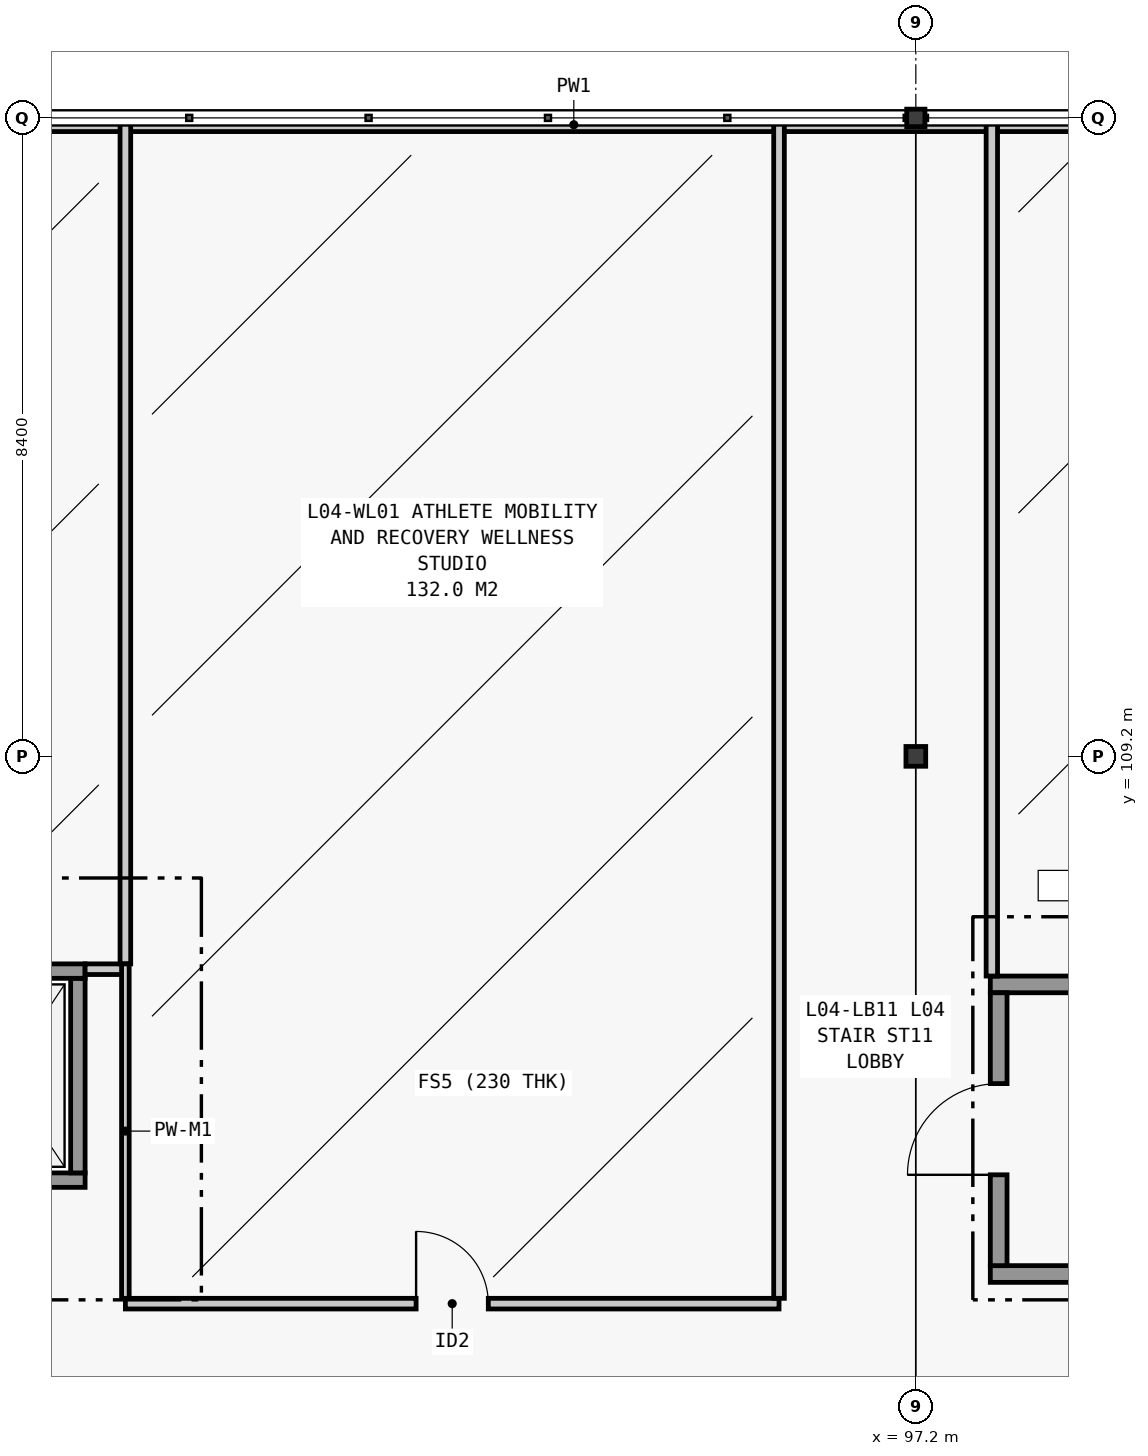
"""IFC4 building model, lengths in metres.
Left out: names, types, materials, properties, quantities, classifications, styles, units other than length and angle.
Written with IfcOpenShell. Run it as: python <this file> out.ifc"""

import sys

from ifc_helpers import new_model, si_unit, direction, frame, frame_2d, origin, origin_2d, place, context, subcontext, project, spatial, rectangle, i_section, extrude, element, fill, save


model = new_model("IFC4")
c1 = context("Model", 3, precision=1e-05, world=origin(), true_north=direction((0.0, 1.0)))
c2 = subcontext(c1, "Body", "Model", "MODEL_VIEW")
j1 = project(units=[si_unit("LENGTHUNIT", "METRE"), si_unit("PLANEANGLEUNIT", "RADIAN")], contexts=[c1])
p1 = place(None, origin())
s1 = spatial("IfcSite", under=j1, at=p1, CompositionType="ELEMENT")
p2 = place(p1, origin())
s2 = spatial("IfcBuilding", under=s1, at=p2, CompositionType="ELEMENT")
p3 = place(p2, frame((0.0, 0.0, 17.4)))
s3 = spatial("IfcBuildingStorey", under=s2, at=p3, CompositionType="ELEMENT", Elevation=17.4)
p4 = place(p3, frame((97.2, 109.2, 0.0), z_axis=(0.0, 0.0, 1.0), x_axis=(1.0, 0.0, 0.0)))
e1 = element("IfcColumn", 1, at=p4, inside=s3, PredefinedType="COLUMN", context=c2, shape_type="SweptSolid", body=[
    extrude(i_section(OverallWidth=0.26, OverallDepth=0.26, WebThickness=0.01, FlangeThickness=0.018, FilletRadius=0.024, at=origin_2d()), origin(), (0.0, 0.0, 1.0), 4.15),
])
p5 = place(p3, frame((97.2, 117.6, 0.0), z_axis=(0.0, 0.0, 1.0), x_axis=(1.0, 0.0, 0.0)))
e2 = element("IfcColumn", 2, at=p5, inside=s3, PredefinedType="COLUMN", context=c2, shape_type="SweptSolid", body=[
    extrude(i_section(OverallWidth=0.24, OverallDepth=0.23, WebThickness=0.008, FlangeThickness=0.012, FilletRadius=0.021, at=origin_2d()), origin(), (0.0, 0.0, 1.0), 4.15),
])
p6 = place(p3, frame((68.4, 117.51, 4.2), z_axis=(0.0, 0.0, 1.0), x_axis=(1.0, 0.0, 0.0)))
e3 = element("IfcWall", 3, at=p6, inside=s3, PredefinedType="PARAPET", context=c2, shape_type="SweptSolid", body=[
    extrude(rectangle(XDim=57.6, YDim=0.18, at=frame_2d((28.8, 0.0))), origin(), (0.0, 0.0, 1.0), 0.95),
])
for number, where, z_axis, x_axis in (
    (4, (98.18, 102.39, 0.0), (0.0, 0.0, 1.0), (1.0, 0.0, 0.0)),
    (5, (106.95, 106.2, 0.0), (0.0, 0.0, 1.0), (-1.0, 0.0, 0.0)),
):
    element("IfcWall", number, at=place(p3, frame(where, z_axis=z_axis, x_axis=x_axis)), inside=s3, PredefinedType="SOLIDWALL", context=c2, shape_type="SweptSolid", body=[
        extrude(rectangle(XDim=8.77, YDim=0.22, at=frame_2d((4.385, 0.0))), origin(), (0.0, 0.0, 1.0), 3.98),
    ])
p7 = place(p3, frame((98.29, 106.09, 0.0), z_axis=(0.0, 0.0, 1.0), x_axis=(0.0, -1.0, 0.0)))
e6 = element("IfcWall", 6, at=p7, inside=s3, PredefinedType="SOLIDWALL", context=c2, shape_type="SweptSolid", body=[
    extrude(rectangle(XDim=3.59, YDim=0.22, at=frame_2d((1.795, 0.0))), origin(), (0.0, 0.0, 1.0), 3.98),
])
p8 = place(p7, frame((1.195, 0.0, 0.0)))
e7 = element("IfcOpeningElement", 7, at=p8, cuts=e6, PredefinedType="OPENING", context=c2, shape_type="SweptSolid", body=[
    extrude(rectangle(XDim=1.2, YDim=2.2, at=frame_2d((0.6, 1.1))), frame((0.0, 0.125, 0.0), z_axis=(0.0, -1.0, 0.0), x_axis=(1.0, 0.0, 0.0)), (0.0, 0.0, 1.0), 0.25),
])
p9 = place(p3, frame((84.13, 103.625, 0.0), z_axis=(0.0, 0.0, 1.0), x_axis=(1.0, 0.0, 0.0)))
e8 = element("IfcWall", 8, at=p9, inside=s3, PredefinedType="SOLIDWALL", context=c2, shape_type="SweptSolid", body=[
    extrude(rectangle(XDim=2.14, YDim=0.19, at=frame_2d((1.07, 0.0))), origin(), (0.0, 0.0, 1.0), 3.98),
])
p10 = place(p9, frame((0.52, 0.0, 0.0)))
e9 = element("IfcOpeningElement", 9, at=p10, cuts=e8, PredefinedType="OPENING", context=c2, shape_type="SweptSolid", body=[
    extrude(rectangle(XDim=1.1, YDim=2.2, at=frame_2d((0.55, 1.1))), frame((0.0, 0.11, 0.0), z_axis=(0.0, -1.0, 0.0), x_axis=(1.0, 0.0, 0.0)), (0.0, 0.0, 1.0), 0.22),
])
p11 = place(p3, frame((86.175, 103.72, 0.0), z_axis=(0.0, 0.0, 1.0), x_axis=(0.0, 1.0, 0.0)))
e10 = element("IfcWall", 10, at=p11, inside=s3, PredefinedType="SOLIDWALL", context=c2, shape_type="SweptSolid", body=[
    extrude(rectangle(XDim=2.56, YDim=0.19, at=frame_2d((1.28, 0.0))), origin(), (0.0, 0.0, 1.0), 3.98),
])
p12 = place(p3, frame((86.27, 106.375, 0.0), z_axis=(0.0, 0.0, 1.0), x_axis=(-1.0, 0.0, 0.0)))
e11 = element("IfcWall", 11, at=p12, inside=s3, PredefinedType="SOLIDWALL", context=c2, shape_type="SweptSolid", body=[
    extrude(rectangle(XDim=2.14, YDim=0.19, at=frame_2d((1.07, 0.0))), origin(), (0.0, 0.0, 1.0), 3.98),
])
p13 = place(p3, frame((86.27, 106.4, 0.0), z_axis=(0.0, 0.0, 1.0), x_axis=(1.0, 0.0, 0.0)))
e12 = element("IfcWall", 12, at=p13, inside=s3, PredefinedType="PARTITIONING", context=c2, shape_type="SweptSolid", body=[
    extrude(rectangle(XDim=0.53, YDim=0.14, at=frame_2d((0.265, 0.0))), origin(), (0.0, 0.0, 1.0), 3.98),
])
p14 = place(p3, frame((86.8, 106.47, 0.0), z_axis=(0.0, 0.0, 1.0), x_axis=(0.0, 1.0, 0.0)))
e13 = element("IfcWall", 13, at=p14, inside=s3, PredefinedType="PARTITIONING", context=c2, shape_type="SweptSolid", body=[
    extrude(rectangle(XDim=11.11, YDim=0.14, at=frame_2d((5.555, 0.0))), origin(), (0.0, 0.0, 1.0), 3.98),
])
p15 = place(p3, frame((86.8, 102.0, 0.0), z_axis=(0.0, 0.0, 1.0), x_axis=(1.0, 0.0, 0.0)))
e14 = element("IfcWall", 14, at=p15, inside=s3, PredefinedType="PARTITIONING", context=c2, shape_type="SweptSolid", body=[
    extrude(rectangle(XDim=8.6, YDim=0.14, at=frame_2d((4.3, 0.0))), origin(), (0.0, 0.0, 1.0), 3.98),
])
p16 = place(p15, frame((3.825, 0.0, 0.0)))
e15 = element("IfcOpeningElement", 15, at=p16, cuts=e14, PredefinedType="OPENING", context=c2, shape_type="SweptSolid", body=[
    extrude(rectangle(XDim=0.95, YDim=2.15, at=frame_2d((0.475, 1.075))), frame((0.0, 0.085, 0.0), z_axis=(0.0, -1.0, 0.0), x_axis=(1.0, 0.0, 0.0)), (0.0, 0.0, 1.0), 0.17),
])
p17 = place(p3, frame((86.8, 102.07, 0.0), z_axis=(0.0, 0.0, 1.0), x_axis=(0.0, 1.0, 0.0)))
e16 = element("IfcWall", 16, at=p17, inside=s3, PredefinedType="MOVABLE", context=c2, shape_type="SweptSolid", body=[
    extrude(rectangle(XDim=4.4, YDim=0.1, at=frame_2d((2.2, 0.0))), origin(), (0.0, 0.0, 1.0), 3.98),
])
p18 = place(p3, frame((95.4, 102.07, 0.0), z_axis=(0.0, 0.0, 1.0), x_axis=(0.0, 1.0, 0.0)))
e17 = element("IfcWall", 17, at=p18, inside=s3, PredefinedType="PARTITIONING", context=c2, shape_type="SweptSolid", body=[
    extrude(rectangle(XDim=15.51, YDim=0.14, at=frame_2d((7.755, 0.0))), origin(), (0.0, 0.0, 1.0), 3.98),
])
p19 = place(p3, frame((98.2, 106.31, 0.0), z_axis=(0.0, 0.0, 1.0), x_axis=(0.0, 1.0, 0.0)))
e18 = element("IfcWall", 18, at=p19, inside=s3, PredefinedType="PLUMBINGWALL", context=c2, shape_type="SweptSolid", body=[
    extrude(rectangle(XDim=11.27, YDim=0.15, at=frame_2d((5.635, 0.0))), origin(), (0.0, 0.0, 1.0), 3.98),
])
p20 = place(p8, frame((1.2, 0.0, 0.0), z_axis=(0.0, 0.0, 1.0), x_axis=(-1.0, 0.0, 0.0)))
e19 = element("IfcDoor", 19, at=p20, inside=s3, OperationType="SINGLE_SWING_RIGHT", PredefinedType="DOOR", context=c2, shape_type="SweptSolid", body=[
    extrude(rectangle(XDim=1.2, YDim=2.2, at=frame_2d((0.6, 1.1))), frame((0.0, 0.025, 0.0), z_axis=(0.0, -1.0, 0.0), x_axis=(1.0, 0.0, 0.0)), (0.0, 0.0, 1.0), 0.05),
])
fill(e7, e19)
p21 = place(p16, origin())
e20 = element("IfcDoor", 20, at=p21, inside=s3, OperationType="SINGLE_SWING_LEFT", PredefinedType="DOOR", context=c2, shape_type="SweptSolid", body=[
    extrude(rectangle(XDim=0.95, YDim=2.15, at=frame_2d((0.475, 1.075))), frame((0.0, 0.025, 0.0), z_axis=(0.0, -1.0, 0.0), x_axis=(1.0, 0.0, 0.0)), (0.0, 0.0, 1.0), 0.05),
])
fill(e15, e20)
save(model, sys.argv[1])
